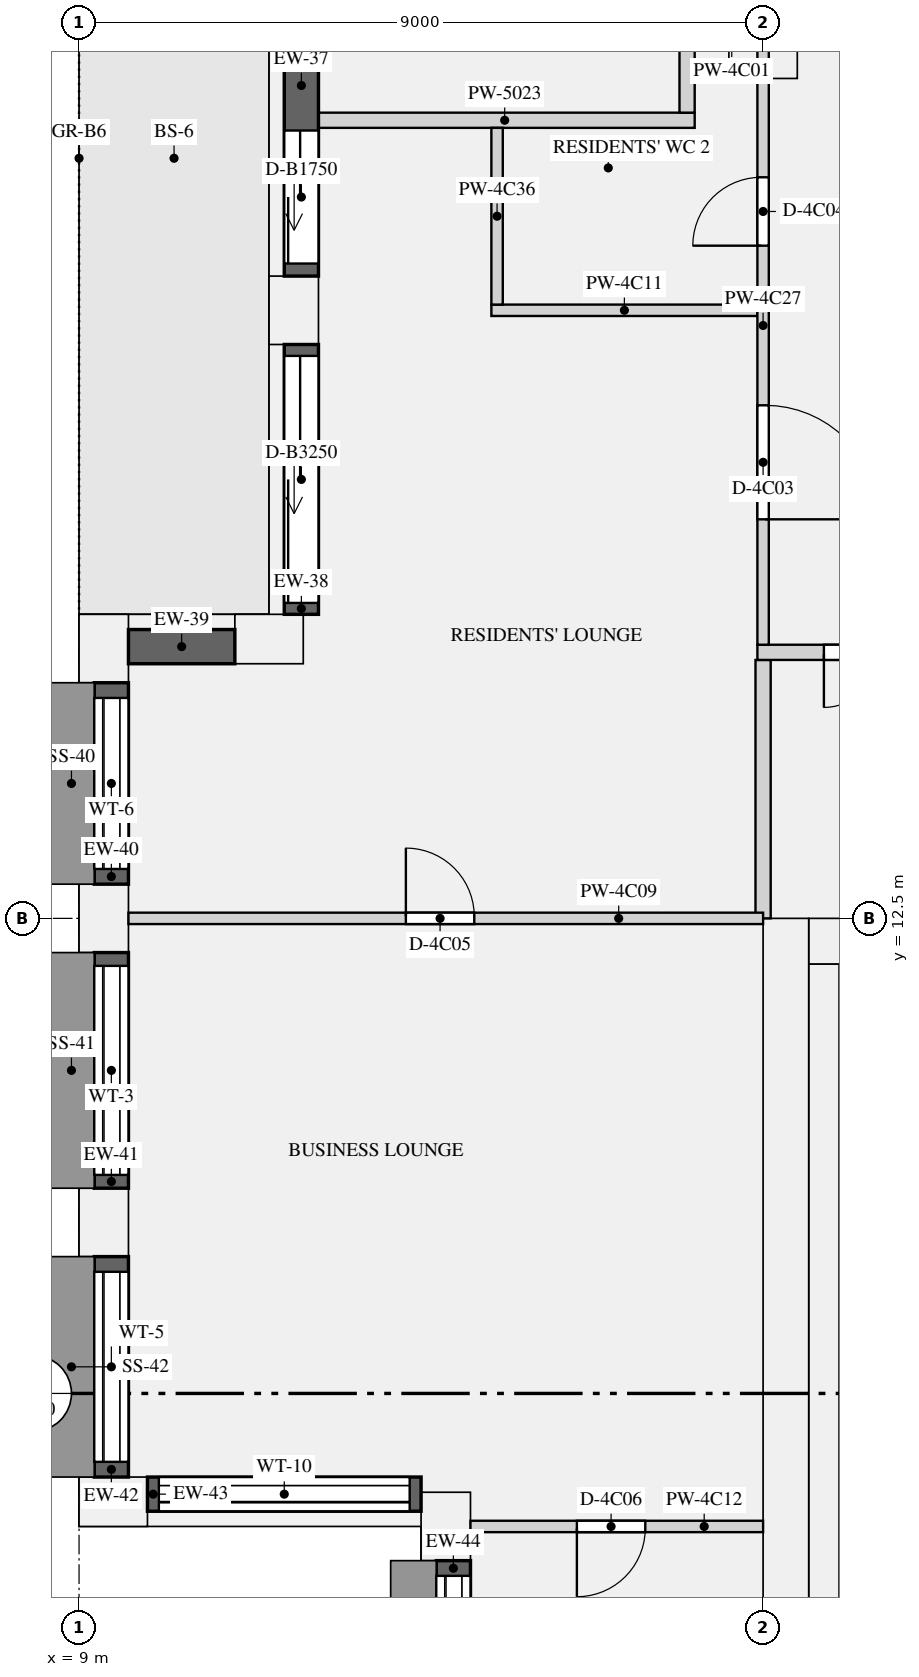
"""IFC4 building model, lengths in metres.
Left out: names, types, materials, properties, quantities, classifications, styles, units other than length and angle.
Written with IfcOpenShell. Run it as: python <this file> out.ifc"""

import sys

from ifc_helpers import new_model, si_unit, direction, frame, frame_2d, origin, origin_2d, place, context, subcontext, project, spatial, rectangle, extrude, element, fill, save


model = new_model("IFC4")
c1 = context("Model", 3, precision=1e-05, world=origin(), true_north=direction((0.0, 1.0)))
c2 = subcontext(c1, "Body", "Model", "MODEL_VIEW")
j1 = project(units=[si_unit("LENGTHUNIT", "METRE"), si_unit("PLANEANGLEUNIT", "RADIAN")], contexts=[c1])
p1 = place(None, origin())
s1 = spatial("IfcSite", under=j1, at=p1, CompositionType="ELEMENT")
p2 = place(p1, origin())
s2 = spatial("IfcBuilding", under=s1, at=p2, CompositionType="ELEMENT")
p3 = place(p2, frame((0.0, 0.0, 216.9)))
s3 = spatial("IfcBuildingStorey", under=s2, at=p3, CompositionType="ELEMENT", Elevation=216.9)
for number, where, z_axis, x_axis in (
    (1, (11.825, 20.5, 0.0), (0.0, 0.0, 1.0), (0.0, -1.0, 0.0)),
    (2, (11.5, 16.175, 0.0), (0.0, 0.0, 1.0), (-1.0, 0.0, 0.0)),
    (3, (9.325, 16.05, 0.0), (0.0, 0.0, 1.0), (0.0, -1.0, 0.0)),
    (4, (9.325, 12.5, 0.0), (0.0, 0.0, 1.0), (0.0, -1.0, 0.0)),
    (5, (9.325, 8.5, 0.0), (0.0, 0.0, 1.0), (0.0, -1.0, 0.0)),
    (6, (9.45, 4.825, 0.0), (0.0, 0.0, 1.0), (1.0, 0.0, 0.0)),
    (7, (13.825, 4.5, 0.0), (0.0, 0.0, 1.0), (0.0, -1.0, 0.0)),
):
    element("IfcColumn", number, at=place(p3, frame(where, z_axis=z_axis, x_axis=x_axis)), inside=s3, PredefinedType="USERDEFINED", context=c2, shape_type="SweptSolid", body=[
        extrude(rectangle(XDim=0.9, YDim=0.65, at=origin_2d()), origin(), (0.0, 0.0, 1.0), 3.15),
    ])
p4 = place(p3, frame((18.0, 24.0, 0.0), z_axis=(0.0, 0.0, 1.0), x_axis=(1.0, 0.0, 0.0)))
e8 = element("IfcColumn", 8, at=p4, inside=s3, PredefinedType="COLUMN", context=c2, shape_type="SweptSolid", body=[
    extrude(rectangle(XDim=0.9, YDim=0.9, at=origin_2d()), origin(), (0.0, 0.0, 1.0), 3.15),
])
p5 = place(p3, frame((18.3, 0.0, 0.0), z_axis=(0.0, 0.0, 1.0), x_axis=(0.0, 1.0, 0.0)))
e9 = element("IfcWall", 9, at=p5, inside=s3, PredefinedType="SHEAR", context=c2, shape_type="SweptSolid", body=[
    extrude(rectangle(XDim=12.5, YDim=0.6, at=frame_2d((6.25, 0.0))), origin(), (0.0, 0.0, 1.0), 3.15),
])
p6 = place(p3, frame((18.6, 12.2, 0.0), z_axis=(0.0, 0.0, 1.0), x_axis=(1.0, 0.0, 0.0)))
e10 = element("IfcWall", 10, at=p6, inside=s3, PredefinedType="SHEAR", context=c2, shape_type="SweptSolid", body=[
    extrude(rectangle(XDim=34.8, YDim=0.6, at=frame_2d((17.4, 0.0))), origin(), (0.0, 0.0, 1.0), 3.15),
])
p7 = place(p6, frame((24.575, 0.0, 0.0)))
e11 = element("IfcOpeningElement", 11, at=p7, cuts=e10, PredefinedType="OPENING", context=c2, shape_type="SweptSolid", body=[
    extrude(rectangle(XDim=1.1, YDim=2.1, at=frame_2d((0.55, 1.05))), frame((0.0, 0.31, 0.0), z_axis=(0.0, -1.0, 0.0), x_axis=(1.0, 0.0, 0.0)), (0.0, 0.0, 1.0), 0.62),
])
p8 = place(p6, frame((26.825, 0.0, 0.0)))
e12 = element("IfcOpeningElement", 12, at=p8, cuts=e10, PredefinedType="OPENING", context=c2, shape_type="SweptSolid", body=[
    extrude(rectangle(XDim=1.1, YDim=2.1, at=frame_2d((0.55, 1.05))), frame((0.0, 0.31, 0.0), z_axis=(0.0, -1.0, 0.0), x_axis=(1.0, 0.0, 0.0)), (0.0, 0.0, 1.0), 0.62),
])
p9 = place(p6, frame((29.075, 0.0, 0.0)))
e13 = element("IfcOpeningElement", 13, at=p9, cuts=e10, PredefinedType="OPENING", context=c2, shape_type="SweptSolid", body=[
    extrude(rectangle(XDim=1.1, YDim=2.1, at=frame_2d((0.55, 1.05))), frame((0.0, 0.31, 0.0), z_axis=(0.0, -1.0, 0.0), x_axis=(1.0, 0.0, 0.0)), (0.0, 0.0, 1.0), 0.62),
])
p10 = place(p6, frame((8.95, 0.0, 0.0)))
e14 = element("IfcOpeningElement", 14, at=p10, cuts=e10, PredefinedType="OPENING", context=c2, shape_type="SweptSolid", body=[
    extrude(rectangle(XDim=0.9, YDim=2.1, at=frame_2d((0.45, 1.05))), frame((0.0, 0.31, 0.0), z_axis=(0.0, -1.0, 0.0), x_axis=(1.0, 0.0, 0.0)), (0.0, 0.0, 1.0), 0.62),
])
p11 = place(p6, frame((1.55, 0.0, 0.0)))
e15 = element("IfcOpeningElement", 15, at=p11, cuts=e10, PredefinedType="OPENING", context=c2, shape_type="SweptSolid", body=[
    extrude(rectangle(XDim=1.2, YDim=2.1, at=frame_2d((0.6, 1.05))), frame((0.0, 0.31, 0.0), z_axis=(0.0, -1.0, 0.0), x_axis=(1.0, 0.0, 0.0)), (0.0, 0.0, 1.0), 0.62),
])
p12 = place(p6, frame((32.05, 0.0, 0.0)))
e16 = element("IfcOpeningElement", 16, at=p12, cuts=e10, PredefinedType="OPENING", context=c2, shape_type="SweptSolid", body=[
    extrude(rectangle(XDim=1.2, YDim=2.1, at=frame_2d((0.6, 1.05))), frame((0.0, 0.31, 0.0), z_axis=(0.0, -1.0, 0.0), x_axis=(1.0, 0.0, 0.0)), (0.0, 0.0, 1.0), 0.62),
])
p13 = place(p3, frame((18.8, 1.0, 0.0), z_axis=(0.0, 0.0, 1.0), x_axis=(0.0, 1.0, 0.0)))
e17 = element("IfcWall", 17, at=p13, inside=s3, PredefinedType="SHEAR", context=c2, shape_type="SweptSolid", body=[
    extrude(rectangle(XDim=10.9, YDim=0.4, at=frame_2d((5.45, 0.0))), origin(), (0.0, 0.0, 1.0), 3.15),
])
p14 = place(p3, frame((11.925, 24.05, 0.0), z_axis=(0.0, 0.0, 1.0), x_axis=(0.0, -1.0, 0.0)))
e18 = element("IfcWall", 18, at=p14, inside=s3, PredefinedType="SOLIDWALL", context=c2, shape_type="SweptSolid", body=[
    extrude(rectangle(XDim=3.1, YDim=0.45, at=frame_2d((1.55, 0.0))), origin(), (0.0, 0.0, 1.0), 2.83),
])
p15 = place(p14, frame((1.185, 0.0, 0.0)))
e19 = element("IfcOpeningElement", 19, at=p15, cuts=e18, PredefinedType="OPENING", context=c2, shape_type="SweptSolid", body=[
    extrude(rectangle(XDim=1.75, YDim=2.3, at=frame_2d((0.875, 1.15))), frame((0.0, 0.235, 0.0), z_axis=(0.0, -1.0, 0.0), x_axis=(1.0, 0.0, 0.0)), (0.0, 0.0, 1.0), 0.47),
])
p16 = place(p3, frame((11.925, 20.05, 0.0), z_axis=(0.0, 0.0, 1.0), x_axis=(0.0, -1.0, 0.0)))
e20 = element("IfcWall", 20, at=p16, inside=s3, PredefinedType="SOLIDWALL", context=c2, shape_type="SweptSolid", body=[
    extrude(rectangle(XDim=3.55, YDim=0.45, at=frame_2d((1.775, 0.0))), origin(), (0.0, 0.0, 1.0), 2.83),
])
p17 = place(p16, frame((0.15, 0.0, 0.0)))
e21 = element("IfcOpeningElement", 21, at=p17, cuts=e20, PredefinedType="OPENING", context=c2, shape_type="SweptSolid", body=[
    extrude(rectangle(XDim=3.25, YDim=2.3, at=frame_2d((1.625, 1.15))), frame((0.0, 0.235, 0.0), z_axis=(0.0, -1.0, 0.0), x_axis=(1.0, 0.0, 0.0)), (0.0, 0.0, 1.0), 0.47),
])
p18 = place(p3, frame((11.05, 16.075, 0.9), z_axis=(0.0, 0.0, 1.0), x_axis=(-1.0, 0.0, 0.0)))
e22 = element("IfcWall", 22, at=p18, inside=s3, PredefinedType="SOLIDWALL", context=c2, shape_type="SweptSolid", body=[
    extrude(rectangle(XDim=1.4, YDim=0.45, at=frame_2d((0.7, 0.0))), origin(), (0.0, 0.0, 1.0), 1.93),
])
p19 = place(p3, frame((9.425, 15.6, 0.9), z_axis=(0.0, 0.0, 1.0), x_axis=(0.0, -1.0, 0.0)))
e23 = element("IfcWall", 23, at=p19, inside=s3, PredefinedType="SOLIDWALL", context=c2, shape_type="SweptSolid", body=[
    extrude(rectangle(XDim=2.65, YDim=0.45, at=frame_2d((1.325, 0.0))), origin(), (0.0, 0.0, 1.0), 1.93),
])
p20 = place(p19, frame((0.2, 0.0, 0.15)))
e24 = element("IfcOpeningElement", 24, at=p20, cuts=e23, PredefinedType="OPENING", context=c2, shape_type="SweptSolid", body=[
    extrude(rectangle(XDim=2.25, YDim=1.5, at=frame_2d((1.125, 0.75))), frame((0.0, 0.235, 0.0), z_axis=(0.0, -1.0, 0.0), x_axis=(1.0, 0.0, 0.0)), (0.0, 0.0, 1.0), 0.47),
])
p21 = place(p3, frame((9.425, 12.05, 0.9), z_axis=(0.0, 0.0, 1.0), x_axis=(0.0, -1.0, 0.0)))
e25 = element("IfcWall", 25, at=p21, inside=s3, PredefinedType="SOLIDWALL", context=c2, shape_type="SweptSolid", body=[
    extrude(rectangle(XDim=3.1, YDim=0.45, at=frame_2d((1.55, 0.0))), origin(), (0.0, 0.0, 1.0), 1.93),
])
p22 = place(p21, frame((0.175, 0.0, 0.15)))
e26 = element("IfcOpeningElement", 26, at=p22, cuts=e25, PredefinedType="OPENING", context=c2, shape_type="SweptSolid", body=[
    extrude(rectangle(XDim=2.75, YDim=1.5, at=frame_2d((1.375, 0.75))), frame((0.0, 0.235, 0.0), z_axis=(0.0, -1.0, 0.0), x_axis=(1.0, 0.0, 0.0)), (0.0, 0.0, 1.0), 0.47),
])
p23 = place(p3, frame((9.425, 8.05, 0.9), z_axis=(0.0, 0.0, 1.0), x_axis=(0.0, -1.0, 0.0)))
e27 = element("IfcWall", 27, at=p23, inside=s3, PredefinedType="SOLIDWALL", context=c2, shape_type="SweptSolid", body=[
    extrude(rectangle(XDim=2.9, YDim=0.45, at=frame_2d((1.45, 0.0))), origin(), (0.0, 0.0, 1.0), 1.93),
])
p24 = place(p23, frame((0.2, 0.0, 0.15)))
e28 = element("IfcOpeningElement", 28, at=p24, cuts=e27, PredefinedType="OPENING", context=c2, shape_type="SweptSolid", body=[
    extrude(rectangle(XDim=2.5, YDim=1.5, at=frame_2d((1.25, 0.75))), frame((0.0, 0.235, 0.0), z_axis=(0.0, -1.0, 0.0), x_axis=(1.0, 0.0, 0.0)), (0.0, 0.0, 1.0), 0.47),
])
p25 = place(p3, frame((9.9, 4.925, 0.9), z_axis=(0.0, 0.0, 1.0), x_axis=(1.0, 0.0, 0.0)))
e29 = element("IfcWall", 29, at=p25, inside=s3, PredefinedType="SOLIDWALL", context=c2, shape_type="SweptSolid", body=[
    extrude(rectangle(XDim=3.6, YDim=0.45, at=frame_2d((1.8, 0.0))), origin(), (0.0, 0.0, 1.0), 1.93),
])
p26 = place(p25, frame((0.15, 0.0, 0.15)))
e30 = element("IfcOpeningElement", 30, at=p26, cuts=e29, PredefinedType="OPENING", context=c2, shape_type="SweptSolid", body=[
    extrude(rectangle(XDim=3.3, YDim=1.5, at=frame_2d((1.65, 0.75))), frame((0.0, 0.235, 0.0), z_axis=(0.0, -1.0, 0.0), x_axis=(1.0, 0.0, 0.0)), (0.0, 0.0, 1.0), 0.47),
])
p27 = place(p3, frame((13.925, 4.05, 0.9), z_axis=(0.0, 0.0, 1.0), x_axis=(0.0, -1.0, 0.0)))
e31 = element("IfcWall", 31, at=p27, inside=s3, PredefinedType="SOLIDWALL", context=c2, shape_type="SweptSolid", body=[
    extrude(rectangle(XDim=3.4, YDim=0.45, at=frame_2d((1.7, 0.0))), origin(), (0.0, 0.0, 1.0), 1.93),
])
p28 = place(p27, frame((0.2, 0.0, 0.15)))
e32 = element("IfcOpeningElement", 32, at=p28, cuts=e31, PredefinedType="OPENING", context=c2, shape_type="SweptSolid", body=[
    extrude(rectangle(XDim=3.0, YDim=1.5, at=frame_2d((1.5, 0.75))), frame((0.0, 0.235, 0.0), z_axis=(0.0, -1.0, 0.0), x_axis=(1.0, 0.0, 0.0)), (0.0, 0.0, 1.0), 0.47),
])
p29 = place(p3, frame((12.1, 23.0, 0.0), z_axis=(0.0, 0.0, 1.0), x_axis=(1.0, 0.0, 0.0)))
e33 = element("IfcWall", 33, at=p29, inside=s3, PredefinedType="PARTITIONING", context=c2, shape_type="SweptSolid", body=[
    extrude(rectangle(XDim=5.0, YDim=0.2, at=frame_2d((2.5, 0.0))), origin(), (0.0, 0.0, 1.0), 2.83),
])
p30 = place(p3, frame((18.0, 12.5, 0.0), z_axis=(0.0, 0.0, 1.0), x_axis=(0.0, 1.0, 0.0)))
e34 = element("IfcWall", 34, at=p30, inside=s3, PredefinedType="PARTITIONING", context=c2, shape_type="SweptSolid", body=[
    extrude(rectangle(XDim=3.4, YDim=0.2, at=frame_2d((1.7, 0.0))), origin(), (0.0, 0.0, 1.0), 2.83),
])
p31 = place(p3, frame((17.0, 23.1, 0.0), z_axis=(0.0, 0.0, 1.0), x_axis=(0.0, 1.0, 0.0)))
e35 = element("IfcWall", 35, at=p31, inside=s3, PredefinedType="PARTITIONING", context=c2, shape_type="SweptSolid", body=[
    extrude(rectangle(XDim=3.8, YDim=0.2, at=frame_2d((1.9, 0.0))), origin(), (0.0, 0.0, 1.0), 2.83),
])
p32 = place(p31, frame((2.1, 0.0, 0.0)))
e36 = element("IfcOpeningElement", 36, at=p32, cuts=e35, PredefinedType="OPENING", context=c2, shape_type="SweptSolid", body=[
    extrude(rectangle(XDim=1.2, YDim=2.1, at=frame_2d((0.6, 1.05))), frame((0.0, 0.11, 0.0), z_axis=(0.0, -1.0, 0.0), x_axis=(1.0, 0.0, 0.0)), (0.0, 0.0, 1.0), 0.22),
])
p33 = place(p3, frame((9.65, 12.5, 0.0), z_axis=(0.0, 0.0, 1.0), x_axis=(1.0, 0.0, 0.0)))
e37 = element("IfcWall", 37, at=p33, inside=s3, PredefinedType="PARTITIONING", context=c2, shape_type="SweptSolid", body=[
    extrude(rectangle(XDim=8.35, YDim=0.15, at=frame_2d((4.175, 0.0))), origin(), (0.0, 0.0, 1.0), 2.83),
])
p34 = place(p33, frame((3.65, 0.0, 0.0)))
e38 = element("IfcOpeningElement", 38, at=p34, cuts=e37, PredefinedType="OPENING", context=c2, shape_type="SweptSolid", body=[
    extrude(rectangle(XDim=0.9, YDim=2.1, at=frame_2d((0.45, 1.05))), frame((0.0, 0.085, 0.0), z_axis=(0.0, -1.0, 0.0), x_axis=(1.0, 0.0, 0.0)), (0.0, 0.0, 1.0), 0.17),
])
p35 = place(p3, frame((14.425, 20.5, 0.0), z_axis=(0.0, 0.0, 1.0), x_axis=(1.0, 0.0, 0.0)))
e39 = element("IfcWall", 39, at=p35, inside=s3, PredefinedType="PARTITIONING", context=c2, shape_type="SweptSolid", body=[
    extrude(rectangle(XDim=3.5, YDim=0.15, at=frame_2d((1.75, 0.0))), origin(), (0.0, 0.0, 1.0), 2.83),
])
p36 = place(p3, frame((14.15, 4.5, 0.0), z_axis=(0.0, 0.0, 1.0), x_axis=(1.0, 0.0, 0.0)))
e40 = element("IfcWall", 40, at=p36, inside=s3, PredefinedType="PARTITIONING", context=c2, shape_type="SweptSolid", body=[
    extrude(rectangle(XDim=3.85, YDim=0.15, at=frame_2d((1.925, 0.0))), origin(), (0.0, 0.0, 1.0), 2.83),
])
p37 = place(p36, frame((1.4, 0.0, 0.0)))
e41 = element("IfcOpeningElement", 41, at=p37, cuts=e40, PredefinedType="OPENING", context=c2, shape_type="SweptSolid", body=[
    extrude(rectangle(XDim=0.9, YDim=2.1, at=frame_2d((0.45, 1.05))), frame((0.0, 0.085, 0.0), z_axis=(0.0, -1.0, 0.0), x_axis=(1.0, 0.0, 0.0)), (0.0, 0.0, 1.0), 0.17),
])
p38 = place(p3, frame((17.925, 16.0, 0.0), z_axis=(0.0, 0.0, 1.0), x_axis=(1.0, 0.0, 0.0)))
e42 = element("IfcWall", 42, at=p38, inside=s3, PredefinedType="PARTITIONING", context=c2, shape_type="SweptSolid", body=[
    extrude(rectangle(XDim=36.175, YDim=0.2, at=frame_2d((18.087, 0.0))), origin(), (0.0, 0.0, 1.0), 2.83),
])
p39 = place(p38, frame((0.875, 0.0, 0.0)))
e43 = element("IfcOpeningElement", 43, at=p39, cuts=e42, PredefinedType="OPENING", context=c2, shape_type="SweptSolid", body=[
    extrude(rectangle(XDim=1.4, YDim=2.1, at=frame_2d((0.7, 1.05))), frame((0.0, 0.11, 0.0), z_axis=(0.0, -1.0, 0.0), x_axis=(1.0, 0.0, 0.0)), (0.0, 0.0, 1.0), 0.22),
])
p40 = place(p38, frame((33.875, 0.0, 0.0)))
e44 = element("IfcOpeningElement", 44, at=p40, cuts=e42, PredefinedType="OPENING", context=c2, shape_type="SweptSolid", body=[
    extrude(rectangle(XDim=1.4, YDim=2.1, at=frame_2d((0.7, 1.05))), frame((0.0, 0.11, 0.0), z_axis=(0.0, -1.0, 0.0), x_axis=(1.0, 0.0, 0.0)), (0.0, 0.0, 1.0), 0.22),
])
p41 = place(p3, frame((18.0, 16.1, 0.0), z_axis=(0.0, 0.0, 1.0), x_axis=(0.0, 1.0, 0.0)))
e45 = element("IfcWall", 45, at=p41, inside=s3, PredefinedType="PARTITIONING", context=c2, shape_type="SweptSolid", body=[
    extrude(rectangle(XDim=7.825, YDim=0.15, at=frame_2d((3.913, 0.0))), origin(), (0.0, 0.0, 1.0), 2.83),
])
p42 = place(p41, frame((1.65, 0.0, 0.0)))
e46 = element("IfcOpeningElement", 46, at=p42, cuts=e45, PredefinedType="OPENING", context=c2, shape_type="SweptSolid", body=[
    extrude(rectangle(XDim=1.5, YDim=2.1, at=frame_2d((0.75, 1.05))), frame((0.0, 0.085, 0.0), z_axis=(0.0, -1.0, 0.0), x_axis=(1.0, 0.0, 0.0)), (0.0, 0.0, 1.0), 0.17),
])
p43 = place(p41, frame((5.25, 0.0, 0.0)))
e47 = element("IfcOpeningElement", 47, at=p43, cuts=e45, PredefinedType="OPENING", context=c2, shape_type="SweptSolid", body=[
    extrude(rectangle(XDim=0.9, YDim=2.1, at=frame_2d((0.45, 1.05))), frame((0.0, 0.085, 0.0), z_axis=(0.0, -1.0, 0.0), x_axis=(1.0, 0.0, 0.0)), (0.0, 0.0, 1.0), 0.17),
])
p44 = place(p3, frame((14.5, 20.575, 0.0), z_axis=(0.0, 0.0, 1.0), x_axis=(0.0, 1.0, 0.0)))
e48 = element("IfcWall", 48, at=p44, inside=s3, PredefinedType="PARTITIONING", context=c2, shape_type="SweptSolid", body=[
    extrude(rectangle(XDim=2.325, YDim=0.15, at=frame_2d((1.163, 0.0))), origin(), (0.0, 0.0, 1.0), 2.83),
])
p45 = place(p15, origin())
e49 = element("IfcDoor", 49, at=p45, inside=s3, OperationType="SLIDING_TO_LEFT", PredefinedType="DOOR", context=c2, shape_type="SweptSolid", body=[
    extrude(rectangle(XDim=1.75, YDim=2.3, at=frame_2d((0.875, 1.15))), frame((0.0, -0.07, 0.0), z_axis=(0.0, -1.0, 0.0), x_axis=(1.0, 0.0, 0.0)), (0.0, 0.0, 1.0), 0.05),
])
fill(e19, e49)
p46 = place(p17, origin())
e50 = element("IfcDoor", 50, at=p46, inside=s3, OperationType="SLIDING_TO_LEFT", PredefinedType="DOOR", context=c2, shape_type="SweptSolid", body=[
    extrude(rectangle(XDim=3.25, YDim=2.3, at=frame_2d((1.625, 1.15))), frame((0.0, -0.07, 0.0), z_axis=(0.0, -1.0, 0.0), x_axis=(1.0, 0.0, 0.0)), (0.0, 0.0, 1.0), 0.05),
])
fill(e21, e50)
p47 = place(p20, origin())
e51 = element("IfcWindow", 51, at=p47, inside=s3, PartitioningType="SINGLE_PANEL", PredefinedType="WINDOW", context=c2, shape_type="SweptSolid", body=[
    extrude(rectangle(XDim=2.25, YDim=1.5, at=frame_2d((1.125, 0.75))), frame((0.0, -0.065, 0.0), z_axis=(0.0, -1.0, 0.0), x_axis=(1.0, 0.0, 0.0)), (0.0, 0.0, 1.0), 0.06),
])
fill(e24, e51)
p48 = place(p22, origin())
e52 = element("IfcWindow", 52, at=p48, inside=s3, PartitioningType="SINGLE_PANEL", PredefinedType="WINDOW", context=c2, shape_type="SweptSolid", body=[
    extrude(rectangle(XDim=2.75, YDim=1.5, at=frame_2d((1.375, 0.75))), frame((0.0, -0.065, 0.0), z_axis=(0.0, -1.0, 0.0), x_axis=(1.0, 0.0, 0.0)), (0.0, 0.0, 1.0), 0.06),
])
fill(e26, e52)
p49 = place(p24, origin())
e53 = element("IfcWindow", 53, at=p49, inside=s3, PartitioningType="SINGLE_PANEL", PredefinedType="WINDOW", context=c2, shape_type="SweptSolid", body=[
    extrude(rectangle(XDim=2.5, YDim=1.5, at=frame_2d((1.25, 0.75))), frame((0.0, -0.065, 0.0), z_axis=(0.0, -1.0, 0.0), x_axis=(1.0, 0.0, 0.0)), (0.0, 0.0, 1.0), 0.06),
])
fill(e28, e53)
p50 = place(p26, origin())
e54 = element("IfcWindow", 54, at=p50, inside=s3, PartitioningType="SINGLE_PANEL", PredefinedType="WINDOW", context=c2, shape_type="SweptSolid", body=[
    extrude(rectangle(XDim=3.3, YDim=1.5, at=frame_2d((1.65, 0.75))), frame((0.0, -0.065, 0.0), z_axis=(0.0, -1.0, 0.0), x_axis=(1.0, 0.0, 0.0)), (0.0, 0.0, 1.0), 0.06),
])
fill(e30, e54)
p51 = place(p28, origin())
e55 = element("IfcWindow", 55, at=p51, inside=s3, PartitioningType="SINGLE_PANEL", PredefinedType="WINDOW", context=c2, shape_type="SweptSolid", body=[
    extrude(rectangle(XDim=3.0, YDim=1.5, at=frame_2d((1.5, 0.75))), frame((0.0, -0.065, 0.0), z_axis=(0.0, -1.0, 0.0), x_axis=(1.0, 0.0, 0.0)), (0.0, 0.0, 1.0), 0.06),
])
fill(e32, e55)
p52 = place(p39, frame((1.4, 0.0, 0.0), z_axis=(0.0, 0.0, 1.0), x_axis=(-1.0, 0.0, 0.0)))
e56 = element("IfcDoor", 56, at=p52, inside=s3, OperationType="DOUBLE_DOOR_SINGLE_SWING", PredefinedType="DOOR", context=c2, shape_type="SweptSolid", body=[
    extrude(rectangle(XDim=1.4, YDim=2.1, at=frame_2d((0.7, 1.05))), frame((0.0, 0.025, 0.0), z_axis=(0.0, -1.0, 0.0), x_axis=(1.0, 0.0, 0.0)), (0.0, 0.0, 1.0), 0.05),
])
fill(e43, e56)
p53 = place(p42, frame((1.5, 0.0, 0.0), z_axis=(0.0, 0.0, 1.0), x_axis=(-1.0, 0.0, 0.0)))
e57 = element("IfcDoor", 57, at=p53, inside=s3, OperationType="SINGLE_SWING_RIGHT", PredefinedType="DOOR", context=c2, shape_type="SweptSolid", body=[
    extrude(rectangle(XDim=1.5, YDim=2.1, at=frame_2d((0.75, 1.05))), frame((0.0, 0.025, 0.0), z_axis=(0.0, -1.0, 0.0), x_axis=(1.0, 0.0, 0.0)), (0.0, 0.0, 1.0), 0.05),
])
fill(e46, e57)
p54 = place(p43, origin())
e58 = element("IfcDoor", 58, at=p54, inside=s3, OperationType="SINGLE_SWING_LEFT", PredefinedType="DOOR", context=c2, shape_type="SweptSolid", body=[
    extrude(rectangle(XDim=0.9, YDim=2.1, at=frame_2d((0.45, 1.05))), frame((0.0, 0.025, 0.0), z_axis=(0.0, -1.0, 0.0), x_axis=(1.0, 0.0, 0.0)), (0.0, 0.0, 1.0), 0.05),
])
fill(e47, e58)
p55 = place(p34, origin())
e59 = element("IfcDoor", 59, at=p55, inside=s3, OperationType="SINGLE_SWING_LEFT", PredefinedType="DOOR", context=c2, shape_type="SweptSolid", body=[
    extrude(rectangle(XDim=0.9, YDim=2.1, at=frame_2d((0.45, 1.05))), frame((0.0, 0.025, 0.0), z_axis=(0.0, -1.0, 0.0), x_axis=(1.0, 0.0, 0.0)), (0.0, 0.0, 1.0), 0.05),
])
fill(e38, e59)
p56 = place(p37, frame((0.9, 0.0, 0.0), z_axis=(0.0, 0.0, 1.0), x_axis=(-1.0, 0.0, 0.0)))
e60 = element("IfcDoor", 60, at=p56, inside=s3, OperationType="SINGLE_SWING_RIGHT", PredefinedType="DOOR", context=c2, shape_type="SweptSolid", body=[
    extrude(rectangle(XDim=0.9, YDim=2.1, at=frame_2d((0.45, 1.05))), frame((0.0, 0.025, 0.0), z_axis=(0.0, -1.0, 0.0), x_axis=(1.0, 0.0, 0.0)), (0.0, 0.0, 1.0), 0.05),
])
fill(e41, e60)
save(model, sys.argv[1])
